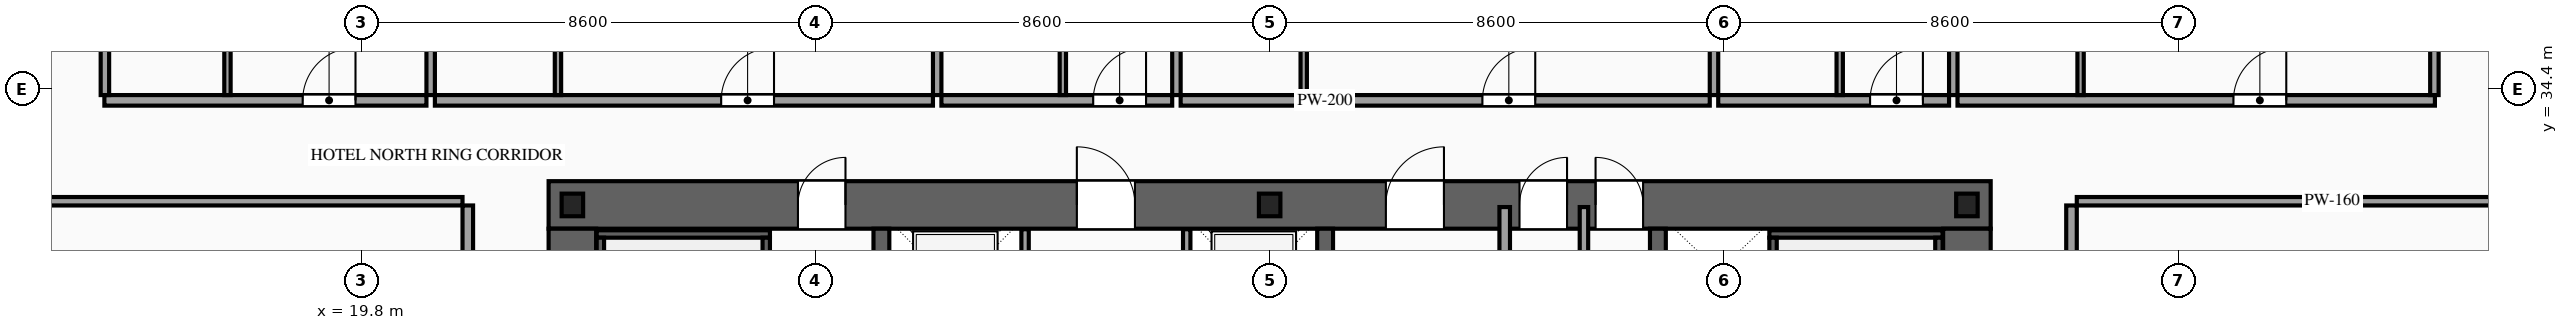
"""IFC4 building model, lengths in metres.
Left out: names, types, materials, properties, quantities, classifications, styles, units other than length and angle.
Written with IfcOpenShell. Run it as: python <this file> out.ifc"""

import sys

from ifc_helpers import new_model, si_unit, direction, frame, frame_2d, origin, origin_2d, place, context, subcontext, project, spatial, rectangle, i_section, extrude, source, transform, mapped, element, fill, save


model = new_model("IFC4")
c1 = context("Model", 3, precision=1e-05, world=origin(), true_north=direction((0.0, 1.0)))
c2 = subcontext(c1, "Body", "Model", "MODEL_VIEW")
j1 = project(units=[si_unit("LENGTHUNIT", "METRE"), si_unit("PLANEANGLEUNIT", "RADIAN")], contexts=[c1])
p1 = place(None, origin())
s1 = spatial("IfcSite", under=j1, at=p1, CompositionType="ELEMENT")
p2 = place(p1, origin())
s2 = spatial("IfcBuilding", under=s1, at=p2, CompositionType="ELEMENT")
p3 = place(p2, frame((0.0, 0.0, 74.8)))
s3 = spatial("IfcBuildingStorey", under=s2, at=p3, CompositionType="ELEMENT", Elevation=74.8)
p4 = place(p3, frame((23.35, 32.2, 0.0), z_axis=(0.0, 0.0, 1.0), x_axis=(1.0, 0.0, 0.0)))
e1 = element("IfcWall", 1, at=p4, inside=s3, PredefinedType="SHEAR", context=c2, shape_type="SweptSolid", body=[
    extrude(rectangle(XDim=27.3, YDim=0.9, at=frame_2d((13.65, 0.0))), origin(), (0.0, 0.0, 1.0), 3.6),
])
p5 = place(p4, frame((4.72, 0.0, 0.0)))
e2 = element("IfcOpeningElement", 2, at=p5, cuts=e1, PredefinedType="OPENING", context=c2, shape_type="SweptSolid", body=[
    extrude(rectangle(XDim=0.9, YDim=2.15, at=frame_2d((0.45, 1.075))), frame((0.0, 0.465, 0.0), z_axis=(0.0, -1.0, 0.0), x_axis=(1.0, 0.0, 0.0)), (0.0, 0.0, 1.0), 0.93),
])
p6 = place(p4, frame((10.0, 0.0, 0.0)))
e3 = element("IfcOpeningElement", 3, at=p6, cuts=e1, PredefinedType="OPENING", context=c2, shape_type="SweptSolid", body=[
    extrude(rectangle(XDim=1.1, YDim=2.2, at=frame_2d((0.55, 1.1))), frame((0.0, 0.465, 0.0), z_axis=(0.0, -1.0, 0.0), x_axis=(1.0, 0.0, 0.0)), (0.0, 0.0, 1.0), 0.93),
])
p7 = place(p4, frame((15.85, 0.0, 0.0)))
e4 = element("IfcOpeningElement", 4, at=p7, cuts=e1, PredefinedType="OPENING", context=c2, shape_type="SweptSolid", body=[
    extrude(rectangle(XDim=1.1, YDim=2.2, at=frame_2d((0.55, 1.1))), frame((0.0, 0.465, 0.0), z_axis=(0.0, -1.0, 0.0), x_axis=(1.0, 0.0, 0.0)), (0.0, 0.0, 1.0), 0.93),
])
p8 = place(p4, frame((18.38, 0.0, 0.0)))
e5 = element("IfcOpeningElement", 5, at=p8, cuts=e1, PredefinedType="OPENING", context=c2, shape_type="SweptSolid", body=[
    extrude(rectangle(XDim=0.9, YDim=2.15, at=frame_2d((0.45, 1.075))), frame((0.0, 0.465, 0.0), z_axis=(0.0, -1.0, 0.0), x_axis=(1.0, 0.0, 0.0)), (0.0, 0.0, 1.0), 0.93),
])
p9 = place(p4, frame((19.82, 0.0, 0.0)))
e6 = element("IfcOpeningElement", 6, at=p9, cuts=e1, PredefinedType="OPENING", context=c2, shape_type="SweptSolid", body=[
    extrude(rectangle(XDim=0.9, YDim=2.15, at=frame_2d((0.45, 1.075))), frame((0.0, 0.465, 0.0), z_axis=(0.0, -1.0, 0.0), x_axis=(1.0, 0.0, 0.0)), (0.0, 0.0, 1.0), 0.93),
])
m1 = source(origin(), c2, "Body", "SweptSolid", [
    extrude(rectangle(XDim=11.9, YDim=0.9, at=frame_2d((5.95, 0.0))), origin(), (0.0, 0.0, 1.0), 3.6),
])
for number, where, z_axis, x_axis in (
    (7, (23.8, 19.85, 0.0), (0.0, 0.0, 1.0), (0.0, 1.0, 0.0)),
    (8, (50.2, 19.85, 0.0), (0.0, 0.0, 1.0), (0.0, 1.0, 0.0)),
):
    element("IfcWall", number, at=place(p3, frame(where, z_axis=z_axis, x_axis=x_axis)), inside=s3, PredefinedType="SHEAR", context=c2, shape_type="MappedRepresentation", body=[
        mapped(m1, transform((0.0, 0.0, 0.0), scale=1.0)),
    ])
m2 = source(origin(), c2, "Body", "SweptSolid", [
    extrude(rectangle(XDim=11.9, YDim=0.3, at=frame_2d((5.95, 0.0))), origin(), (0.0, 0.0, 1.0), 3.6),
])
for number, where, z_axis, x_axis in (
    (9, (29.65, 19.85, 0.0), (0.0, 0.0, 1.0), (0.0, 1.0, 0.0)),
    (10, (38.05, 19.85, 0.0), (0.0, 0.0, 1.0), (0.0, 1.0, 0.0)),
    (11, (44.35, 19.85, 0.0), (0.0, 0.0, 1.0), (0.0, 1.0, 0.0)),
):
    element("IfcWall", number, at=place(p3, frame(where, z_axis=z_axis, x_axis=x_axis)), inside=s3, PredefinedType="SOLIDWALL", context=c2, shape_type="MappedRepresentation", body=[
        mapped(m2, transform((0.0, 0.0, 0.0), scale=1.0)),
    ])
m3 = source(origin(), c2, "Body", "SweptSolid", [
    extrude(i_section(OverallWidth=0.407, OverallDepth=0.428, WebThickness=0.02, FlangeThickness=0.035, at=origin_2d()), origin(), (0.0, 0.0, 1.0), 3.6),
])
for number, where, z_axis, x_axis in (
    (12, (23.8, 32.2, 0.0), (0.0, 0.0, 1.0), (1.0, 0.0, 0.0)),
    (13, (37.0, 32.2, 0.0), (0.0, 0.0, 1.0), (1.0, 0.0, 0.0)),
    (14, (50.2, 32.2, 0.0), (0.0, 0.0, 1.0), (1.0, 0.0, 0.0)),
):
    element("IfcColumn", number, at=place(p3, frame(where, z_axis=z_axis, x_axis=x_axis)), inside=s3, PredefinedType="COLUMN", context=c2, shape_type="MappedRepresentation", body=[
        mapped(m3, transform((0.0, 0.0, 0.0), scale=1.0)),
    ])
p10 = place(p3, frame((32.37, 29.4, 0.0), z_axis=(0.0, 0.0, 1.0), x_axis=(0.0, 1.0, 0.0)))
e15 = element("IfcWall", 15, at=p10, inside=s3, PredefinedType="SOLIDWALL", context=c2, shape_type="SweptSolid", body=[
    extrude(rectangle(XDim=2.34, YDim=0.14, at=frame_2d((1.17, 0.0))), origin(), (0.0, 0.0, 1.0), 3.38),
])
p11 = place(p10, frame((0.62, 0.0, 0.0)))
e16 = element("IfcOpeningElement", 16, at=p11, cuts=e15, PredefinedType="OPENING", context=c2, shape_type="SweptSolid", body=[
    extrude(rectangle(XDim=1.1, YDim=2.2, at=frame_2d((0.55, 1.1))), frame((0.0, 0.085, 0.0), z_axis=(0.0, -1.0, 0.0), x_axis=(1.0, 0.0, 0.0)), (0.0, 0.0, 1.0), 0.17),
])
p12 = place(p3, frame((35.43, 29.4, 0.0), z_axis=(0.0, 0.0, 1.0), x_axis=(0.0, 1.0, 0.0)))
e17 = element("IfcWall", 17, at=p12, inside=s3, PredefinedType="SOLIDWALL", context=c2, shape_type="SweptSolid", body=[
    extrude(rectangle(XDim=2.34, YDim=0.14, at=frame_2d((1.17, 0.0))), origin(), (0.0, 0.0, 1.0), 3.38),
])
p13 = place(p12, frame((0.62, 0.0, 0.0)))
e18 = element("IfcOpeningElement", 18, at=p13, cuts=e17, PredefinedType="OPENING", context=c2, shape_type="SweptSolid", body=[
    extrude(rectangle(XDim=1.1, YDim=2.2, at=frame_2d((0.55, 1.1))), frame((0.0, 0.085, 0.0), z_axis=(0.0, -1.0, 0.0), x_axis=(1.0, 0.0, 0.0)), (0.0, 0.0, 1.0), 0.17),
])
m4 = source(origin(), c2, "Body", "SweptSolid", [
    extrude(rectangle(XDim=3.28, YDim=0.14, at=frame_2d((1.64, 0.0))), origin(), (0.0, 0.0, 1.0), 3.38),
])
p14 = place(p3, frame((24.26, 31.65, 0.0), z_axis=(0.0, 0.0, 1.0), x_axis=(1.0, 0.0, 0.0)))
e19 = element("IfcWall", 19, at=p14, inside=s3, PredefinedType="SOLIDWALL", context=c2, shape_type="MappedRepresentation", body=[
    mapped(m4, transform((0.0, 0.0, 0.0), scale=1.0)),
])
m5 = source(origin(), c2, "Body", "SweptSolid", [
    extrude(rectangle(XDim=8.94, YDim=0.14, at=frame_2d((4.47, 0.0))), origin(), (0.0, 0.0, 1.0), 3.38),
])
for number, where, z_axis, x_axis in (
    (20, (24.33, 22.64, 0.0), (0.0, 0.0, 1.0), (0.0, 1.0, 0.0)),
    (21, (27.47, 22.64, 0.0), (0.0, 0.0, 1.0), (0.0, 1.0, 0.0)),
):
    element("IfcWall", number, at=place(p3, frame(where, z_axis=z_axis, x_axis=x_axis)), inside=s3, PredefinedType="SOLIDWALL", context=c2, shape_type="MappedRepresentation", body=[
        mapped(m5, transform((0.0, 0.0, 0.0), scale=1.0)),
    ])
p15 = place(p3, frame((46.46, 31.65, 0.0), z_axis=(0.0, 0.0, 1.0), x_axis=(1.0, 0.0, 0.0)))
e22 = element("IfcWall", 22, at=p15, inside=s3, PredefinedType="SOLIDWALL", context=c2, shape_type="MappedRepresentation", body=[
    mapped(m4, transform((0.0, 0.0, 0.0), scale=1.0)),
])
for number, where, z_axis, x_axis in (
    (23, (46.53, 22.64, 0.0), (0.0, 0.0, 1.0), (0.0, 1.0, 0.0)),
    (24, (49.67, 22.64, 0.0), (0.0, 0.0, 1.0), (0.0, 1.0, 0.0)),
):
    element("IfcWall", number, at=place(p3, frame(where, z_axis=z_axis, x_axis=x_axis)), inside=s3, PredefinedType="SOLIDWALL", context=c2, shape_type="MappedRepresentation", body=[
        mapped(m5, transform((0.0, 0.0, 0.0), scale=1.0)),
    ])
m6 = source(origin(), c2, "Body", "SweptSolid", [
    extrude(rectangle(XDim=5.96, YDim=0.2, at=frame_2d((2.98, 0.0))), origin(), (0.0, 0.0, 1.0), 3.38),
])
p16 = place(p3, frame((41.45, 26.2, 0.0), z_axis=(0.0, 0.0, 1.0), x_axis=(0.0, 1.0, 0.0)))
e25 = element("IfcWall", 25, at=p16, inside=s3, PredefinedType="PARTITIONING", context=c2, shape_type="MappedRepresentation", body=[
    mapped(m6, transform((0.0, 0.0, 0.0), scale=1.0)),
])
m7 = source(origin(), c2, "Body", "SweptSolid", [
    extrude(rectangle(XDim=5.96, YDim=0.16, at=frame_2d((2.98, 0.0))), origin(), (0.0, 0.0, 1.0), 3.38),
])
p17 = place(p3, frame((42.95, 26.2, 0.0), z_axis=(0.0, 0.0, 1.0), x_axis=(0.0, 1.0, 0.0)))
e26 = element("IfcWall", 26, at=p17, inside=s3, PredefinedType="PARTITIONING", context=c2, shape_type="MappedRepresentation", body=[
    mapped(m7, transform((0.0, 0.0, 0.0), scale=1.0)),
])
p18 = place(p3, frame((14.94, 34.18, 0.0), z_axis=(0.0, 0.0, 1.0), x_axis=(1.0, 0.0, 0.0)))
e27 = element("IfcWall", 27, at=p18, inside=s3, PredefinedType="PARTITIONING", context=c2, shape_type="SweptSolid", body=[
    extrude(rectangle(XDim=6.097, YDim=0.2, at=frame_2d((3.049, 0.0))), origin(), (0.0, 0.0, 1.0), 3.38),
])
p19 = place(p18, frame((3.754, 0.0, 0.0)))
e28 = element("IfcOpeningElement", 28, at=p19, cuts=e27, PredefinedType="OPENING", context=c2, shape_type="SweptSolid", body=[
    extrude(rectangle(XDim=1.0, YDim=2.2, at=frame_2d((0.5, 1.1))), frame((0.0, 0.115, 0.0), z_axis=(0.0, -1.0, 0.0), x_axis=(1.0, 0.0, 0.0)), (0.0, 0.0, 1.0), 0.23),
])
m8 = source(origin(), c2, "Body", "SweptSolid", [
    extrude(rectangle(XDim=16.47, YDim=0.16, at=frame_2d((8.235, 0.0))), origin(), (0.0, 0.0, 1.0), 3.38),
])
p20 = place(p3, frame((21.117, 34.28, 0.0), z_axis=(0.0, 0.0, 1.0), x_axis=(0.0, 1.0, 0.0)))
e29 = element("IfcWall", 29, at=p20, inside=s3, PredefinedType="PARTITIONING", context=c2, shape_type="MappedRepresentation", body=[
    mapped(m8, transform((0.0, 0.0, 0.0), scale=1.0)),
])
m9 = source(origin(), c2, "Body", "SweptSolid", [
    extrude(rectangle(XDim=2.42, YDim=0.12, at=frame_2d((1.21, 0.0))), origin(), (0.0, 0.0, 1.0), 3.38),
])
p21 = place(p3, frame((17.27, 34.28, 0.0), z_axis=(0.0, 0.0, 1.0), x_axis=(0.0, 1.0, 0.0)))
e30 = element("IfcWall", 30, at=p21, inside=s3, PredefinedType="PARTITIONING", context=c2, shape_type="MappedRepresentation", body=[
    mapped(m9, transform((0.0, 0.0, 0.0), scale=1.0)),
])
p22 = place(p3, frame((21.197, 34.18, 0.0), z_axis=(0.0, 0.0, 1.0), x_axis=(1.0, 0.0, 0.0)))
e31 = element("IfcWall", 31, at=p22, inside=s3, PredefinedType="PARTITIONING", context=c2, shape_type="SweptSolid", body=[
    extrude(rectangle(XDim=9.429, YDim=0.2, at=frame_2d((4.714, 0.0))), origin(), (0.0, 0.0, 1.0), 3.38),
])
p23 = place(p22, frame((5.42, 0.0, 0.0)))
e32 = element("IfcOpeningElement", 32, at=p23, cuts=e31, PredefinedType="OPENING", context=c2, shape_type="SweptSolid", body=[
    extrude(rectangle(XDim=1.0, YDim=2.2, at=frame_2d((0.5, 1.1))), frame((0.0, 0.115, 0.0), z_axis=(0.0, -1.0, 0.0), x_axis=(1.0, 0.0, 0.0)), (0.0, 0.0, 1.0), 0.23),
])
p24 = place(p3, frame((30.706, 34.28, 0.0), z_axis=(0.0, 0.0, 1.0), x_axis=(0.0, 1.0, 0.0)))
e33 = element("IfcWall", 33, at=p24, inside=s3, PredefinedType="PARTITIONING", context=c2, shape_type="MappedRepresentation", body=[
    mapped(m8, transform((0.0, 0.0, 0.0), scale=1.0)),
])
p25 = place(p3, frame((23.527, 34.28, 0.0), z_axis=(0.0, 0.0, 1.0), x_axis=(0.0, 1.0, 0.0)))
e34 = element("IfcWall", 34, at=p25, inside=s3, PredefinedType="PARTITIONING", context=c2, shape_type="MappedRepresentation", body=[
    mapped(m9, transform((0.0, 0.0, 0.0), scale=1.0)),
])
p26 = place(p3, frame((30.786, 34.18, 0.0), z_axis=(0.0, 0.0, 1.0), x_axis=(1.0, 0.0, 0.0)))
e35 = element("IfcWall", 35, at=p26, inside=s3, PredefinedType="PARTITIONING", context=c2, shape_type="SweptSolid", body=[
    extrude(rectangle(XDim=4.369, YDim=0.2, at=frame_2d((2.185, 0.0))), origin(), (0.0, 0.0, 1.0), 3.38),
])
p27 = place(p26, frame((2.874, 0.0, 0.0)))
e36 = element("IfcOpeningElement", 36, at=p27, cuts=e35, PredefinedType="OPENING", context=c2, shape_type="SweptSolid", body=[
    extrude(rectangle(XDim=1.0, YDim=2.2, at=frame_2d((0.5, 1.1))), frame((0.0, 0.115, 0.0), z_axis=(0.0, -1.0, 0.0), x_axis=(1.0, 0.0, 0.0)), (0.0, 0.0, 1.0), 0.23),
])
p28 = place(p3, frame((35.235, 34.28, 0.0), z_axis=(0.0, 0.0, 1.0), x_axis=(0.0, 1.0, 0.0)))
e37 = element("IfcWall", 37, at=p28, inside=s3, PredefinedType="PARTITIONING", context=c2, shape_type="MappedRepresentation", body=[
    mapped(m8, transform((0.0, 0.0, 0.0), scale=1.0)),
])
p29 = place(p3, frame((33.085, 34.28, 0.0), z_axis=(0.0, 0.0, 1.0), x_axis=(0.0, 1.0, 0.0)))
e38 = element("IfcWall", 38, at=p29, inside=s3, PredefinedType="PARTITIONING", context=c2, shape_type="MappedRepresentation", body=[
    mapped(m9, transform((0.0, 0.0, 0.0), scale=1.0)),
])
p30 = place(p3, frame((35.315, 34.18, 0.0), z_axis=(0.0, 0.0, 1.0), x_axis=(1.0, 0.0, 0.0)))
e39 = element("IfcWall", 39, at=p30, inside=s3, PredefinedType="PARTITIONING", context=c2, shape_type="SweptSolid", body=[
    extrude(rectangle(XDim=10.017, YDim=0.2, at=frame_2d((5.009, 0.0))), origin(), (0.0, 0.0, 1.0), 3.38),
])
p31 = place(p30, frame((5.713, 0.0, 0.0)))
e40 = element("IfcOpeningElement", 40, at=p31, cuts=e39, PredefinedType="OPENING", context=c2, shape_type="SweptSolid", body=[
    extrude(rectangle(XDim=1.0, YDim=2.2, at=frame_2d((0.5, 1.1))), frame((0.0, 0.115, 0.0), z_axis=(0.0, -1.0, 0.0), x_axis=(1.0, 0.0, 0.0)), (0.0, 0.0, 1.0), 0.23),
])
p32 = place(p3, frame((45.412, 34.28, 0.0), z_axis=(0.0, 0.0, 1.0), x_axis=(0.0, 1.0, 0.0)))
e41 = element("IfcWall", 41, at=p32, inside=s3, PredefinedType="PARTITIONING", context=c2, shape_type="MappedRepresentation", body=[
    mapped(m8, transform((0.0, 0.0, 0.0), scale=1.0)),
])
p33 = place(p3, frame((37.645, 34.28, 0.0), z_axis=(0.0, 0.0, 1.0), x_axis=(0.0, 1.0, 0.0)))
e42 = element("IfcWall", 42, at=p33, inside=s3, PredefinedType="PARTITIONING", context=c2, shape_type="MappedRepresentation", body=[
    mapped(m9, transform((0.0, 0.0, 0.0), scale=1.0)),
])
p34 = place(p3, frame((45.492, 34.18, 0.0), z_axis=(0.0, 0.0, 1.0), x_axis=(1.0, 0.0, 0.0)))
e43 = element("IfcWall", 43, at=p34, inside=s3, PredefinedType="PARTITIONING", context=c2, shape_type="SweptSolid", body=[
    extrude(rectangle(XDim=4.37, YDim=0.2, at=frame_2d((2.185, 0.0))), origin(), (0.0, 0.0, 1.0), 3.38),
])
p35 = place(p34, frame((2.875, 0.0, 0.0)))
e44 = element("IfcOpeningElement", 44, at=p35, cuts=e43, PredefinedType="OPENING", context=c2, shape_type="SweptSolid", body=[
    extrude(rectangle(XDim=1.0, YDim=2.2, at=frame_2d((0.5, 1.1))), frame((0.0, 0.115, 0.0), z_axis=(0.0, -1.0, 0.0), x_axis=(1.0, 0.0, 0.0)), (0.0, 0.0, 1.0), 0.23),
])
p36 = place(p3, frame((49.942, 34.28, 0.0), z_axis=(0.0, 0.0, 1.0), x_axis=(0.0, 1.0, 0.0)))
e45 = element("IfcWall", 45, at=p36, inside=s3, PredefinedType="PARTITIONING", context=c2, shape_type="MappedRepresentation", body=[
    mapped(m8, transform((0.0, 0.0, 0.0), scale=1.0)),
])
p37 = place(p3, frame((47.792, 34.28, 0.0), z_axis=(0.0, 0.0, 1.0), x_axis=(0.0, 1.0, 0.0)))
e46 = element("IfcWall", 46, at=p37, inside=s3, PredefinedType="PARTITIONING", context=c2, shape_type="MappedRepresentation", body=[
    mapped(m9, transform((0.0, 0.0, 0.0), scale=1.0)),
])
p38 = place(p3, frame((50.022, 34.18, 0.0), z_axis=(0.0, 0.0, 1.0), x_axis=(1.0, 0.0, 0.0)))
e47 = element("IfcWall", 47, at=p38, inside=s3, PredefinedType="PARTITIONING", context=c2, shape_type="SweptSolid", body=[
    extrude(rectangle(XDim=9.038, YDim=0.2, at=frame_2d((4.519, 0.0))), origin(), (0.0, 0.0, 1.0), 3.38),
])
p39 = place(p38, frame((5.224, 0.0, 0.0)))
e48 = element("IfcOpeningElement", 48, at=p39, cuts=e47, PredefinedType="OPENING", context=c2, shape_type="SweptSolid", body=[
    extrude(rectangle(XDim=1.0, YDim=2.2, at=frame_2d((0.5, 1.1))), frame((0.0, 0.115, 0.0), z_axis=(0.0, -1.0, 0.0), x_axis=(1.0, 0.0, 0.0)), (0.0, 0.0, 1.0), 0.23),
])
m10 = source(origin(), c2, "Body", "SweptSolid", [
    extrude(rectangle(XDim=16.32, YDim=0.16, at=frame_2d((8.16, 0.0))), origin(), (0.0, 0.0, 1.0), 3.38),
])
for number, where, z_axis, x_axis in (
    (49, (14.95, 34.28, 0.0), (0.0, 0.0, 1.0), (0.0, 1.0, 0.0)),
    (50, (59.05, 34.28, 0.0), (0.0, 0.0, 1.0), (0.0, 1.0, 0.0)),
):
    element("IfcWall", number, at=place(p3, frame(where, z_axis=z_axis, x_axis=x_axis)), inside=s3, PredefinedType="PARTITIONING", context=c2, shape_type="MappedRepresentation", body=[
        mapped(m10, transform((0.0, 0.0, 0.0), scale=1.0)),
    ])
p40 = place(p3, frame((52.352, 34.28, 0.0), z_axis=(0.0, 0.0, 1.0), x_axis=(0.0, 1.0, 0.0)))
e51 = element("IfcWall", 51, at=p40, inside=s3, PredefinedType="PARTITIONING", context=c2, shape_type="MappedRepresentation", body=[
    mapped(m9, transform((0.0, 0.0, 0.0), scale=1.0)),
])
p41 = place(p3, frame((21.82, 25.88, 0.0), z_axis=(0.0, 0.0, 1.0), x_axis=(0.0, 1.0, 0.0)))
e52 = element("IfcWall", 52, at=p41, inside=s3, PredefinedType="PARTITIONING", context=c2, shape_type="SweptSolid", body=[
    extrude(rectangle(XDim=6.31, YDim=0.2, at=frame_2d((3.155, 0.0))), origin(), (0.0, 0.0, 1.0), 3.38),
])
p42 = place(p41, frame((2.655, 0.0, 0.0)))
e53 = element("IfcOpeningElement", 53, at=p42, cuts=e52, PredefinedType="OPENING", context=c2, shape_type="SweptSolid", body=[
    extrude(rectangle(XDim=1.0, YDim=2.2, at=frame_2d((0.5, 1.1))), frame((0.0, 0.115, 0.0), z_axis=(0.0, -1.0, 0.0), x_axis=(1.0, 0.0, 0.0)), (0.0, 0.0, 1.0), 0.23),
])
m11 = source(origin(), c2, "Body", "SweptSolid", [
    extrude(rectangle(XDim=9.67, YDim=0.16, at=frame_2d((4.835, 0.0))), origin(), (0.0, 0.0, 1.0), 2.875),
])
p43 = place(p3, frame((12.05, 32.27, 0.0), z_axis=(0.0, 0.0, 1.0), x_axis=(1.0, 0.0, 0.0)))
e54 = element("IfcWall", 54, at=p43, inside=s3, PredefinedType="PARTITIONING", context=c2, shape_type="MappedRepresentation", body=[
    mapped(m11, transform((0.0, 0.0, 0.0), scale=1.0)),
])
p44 = place(p3, frame((52.18, 25.88, 0.0), z_axis=(0.0, 0.0, 1.0), x_axis=(0.0, 1.0, 0.0)))
e55 = element("IfcWall", 55, at=p44, inside=s3, PredefinedType="PARTITIONING", context=c2, shape_type="SweptSolid", body=[
    extrude(rectangle(XDim=6.31, YDim=0.2, at=frame_2d((3.155, 0.0))), origin(), (0.0, 0.0, 1.0), 3.38),
])
p45 = place(p44, frame((2.655, 0.0, 0.0)))
e56 = element("IfcOpeningElement", 56, at=p45, cuts=e55, PredefinedType="OPENING", context=c2, shape_type="SweptSolid", body=[
    extrude(rectangle(XDim=1.0, YDim=2.2, at=frame_2d((0.5, 1.1))), frame((0.0, 0.115, 0.0), z_axis=(0.0, -1.0, 0.0), x_axis=(1.0, 0.0, 0.0)), (0.0, 0.0, 1.0), 0.23),
])
p46 = place(p3, frame((52.28, 32.27, 0.0), z_axis=(0.0, 0.0, 1.0), x_axis=(1.0, 0.0, 0.0)))
e57 = element("IfcWall", 57, at=p46, inside=s3, PredefinedType="PARTITIONING", context=c2, shape_type="MappedRepresentation", body=[
    mapped(m11, transform((0.0, 0.0, 0.0), scale=1.0)),
])
m12 = source(origin(), c2, "Body", "SweptSolid", [
    extrude(rectangle(XDim=0.9, YDim=2.15, at=frame_2d((0.45, 1.075))), frame((0.0, 0.025, 0.0), z_axis=(0.0, -1.0, 0.0), x_axis=(1.0, 0.0, 0.0)), (0.0, 0.0, 1.0), 0.05),
])
p47 = place(p5, origin())
e58 = element("IfcDoor", 58, at=p47, inside=s3, OperationType="SINGLE_SWING_RIGHT", PredefinedType="DOOR", context=c2, shape_type="MappedRepresentation", body=[
    mapped(m12, transform((0.0, 0.0, 0.0), scale=1.0)),
])
fill(e2, e58)
m13 = source(origin(), c2, "Body", "SweptSolid", [
    extrude(rectangle(XDim=1.1, YDim=2.2, at=frame_2d((0.55, 1.1))), frame((0.0, 0.025, 0.0), z_axis=(0.0, -1.0, 0.0), x_axis=(1.0, 0.0, 0.0)), (0.0, 0.0, 1.0), 0.05),
])
p48 = place(p6, origin())
e59 = element("IfcDoor", 59, at=p48, inside=s3, OperationType="SINGLE_SWING_LEFT", PredefinedType="DOOR", context=c2, shape_type="MappedRepresentation", body=[
    mapped(m13, transform((0.0, 0.0, 0.0), scale=1.0)),
])
fill(e3, e59)
p49 = place(p7, origin())
e60 = element("IfcDoor", 60, at=p49, inside=s3, OperationType="SINGLE_SWING_RIGHT", PredefinedType="DOOR", context=c2, shape_type="MappedRepresentation", body=[
    mapped(m13, transform((0.0, 0.0, 0.0), scale=1.0)),
])
fill(e4, e60)
p50 = place(p8, origin())
e61 = element("IfcDoor", 61, at=p50, inside=s3, OperationType="SINGLE_SWING_RIGHT", PredefinedType="DOOR", context=c2, shape_type="MappedRepresentation", body=[
    mapped(m12, transform((0.0, 0.0, 0.0), scale=1.0)),
])
fill(e5, e61)
p51 = place(p9, origin())
e62 = element("IfcDoor", 62, at=p51, inside=s3, OperationType="SINGLE_SWING_LEFT", PredefinedType="DOOR", context=c2, shape_type="MappedRepresentation", body=[
    mapped(m12, transform((0.0, 0.0, 0.0), scale=1.0)),
])
fill(e6, e62)
m14 = source(origin(), c2, "Body", "SweptSolid", [
    extrude(rectangle(XDim=1.0, YDim=2.2, at=frame_2d((0.5, 1.1))), frame((0.0, 0.025, 0.0), z_axis=(0.0, -1.0, 0.0), x_axis=(1.0, 0.0, 0.0)), (0.0, 0.0, 1.0), 0.05),
])
p52 = place(p19, origin())
e63 = element("IfcDoor", 63, at=p52, inside=s3, OperationType="SINGLE_SWING_RIGHT", PredefinedType="DOOR", context=c2, shape_type="MappedRepresentation", body=[
    mapped(m14, transform((0.0, 0.0, 0.0), scale=1.0)),
])
fill(e28, e63)
p53 = place(p23, origin())
e64 = element("IfcDoor", 64, at=p53, inside=s3, OperationType="SINGLE_SWING_RIGHT", PredefinedType="DOOR", context=c2, shape_type="MappedRepresentation", body=[
    mapped(m14, transform((0.0, 0.0, 0.0), scale=1.0)),
])
fill(e32, e64)
p54 = place(p27, origin())
e65 = element("IfcDoor", 65, at=p54, inside=s3, OperationType="SINGLE_SWING_RIGHT", PredefinedType="DOOR", context=c2, shape_type="MappedRepresentation", body=[
    mapped(m14, transform((0.0, 0.0, 0.0), scale=1.0)),
])
fill(e36, e65)
p55 = place(p31, origin())
e66 = element("IfcDoor", 66, at=p55, inside=s3, OperationType="SINGLE_SWING_RIGHT", PredefinedType="DOOR", context=c2, shape_type="MappedRepresentation", body=[
    mapped(m14, transform((0.0, 0.0, 0.0), scale=1.0)),
])
fill(e40, e66)
p56 = place(p35, origin())
e67 = element("IfcDoor", 67, at=p56, inside=s3, OperationType="SINGLE_SWING_RIGHT", PredefinedType="DOOR", context=c2, shape_type="MappedRepresentation", body=[
    mapped(m14, transform((0.0, 0.0, 0.0), scale=1.0)),
])
fill(e44, e67)
p57 = place(p39, origin())
e68 = element("IfcDoor", 68, at=p57, inside=s3, OperationType="SINGLE_SWING_RIGHT", PredefinedType="DOOR", context=c2, shape_type="MappedRepresentation", body=[
    mapped(m14, transform((0.0, 0.0, 0.0), scale=1.0)),
])
fill(e48, e68)
save(model, sys.argv[1])
